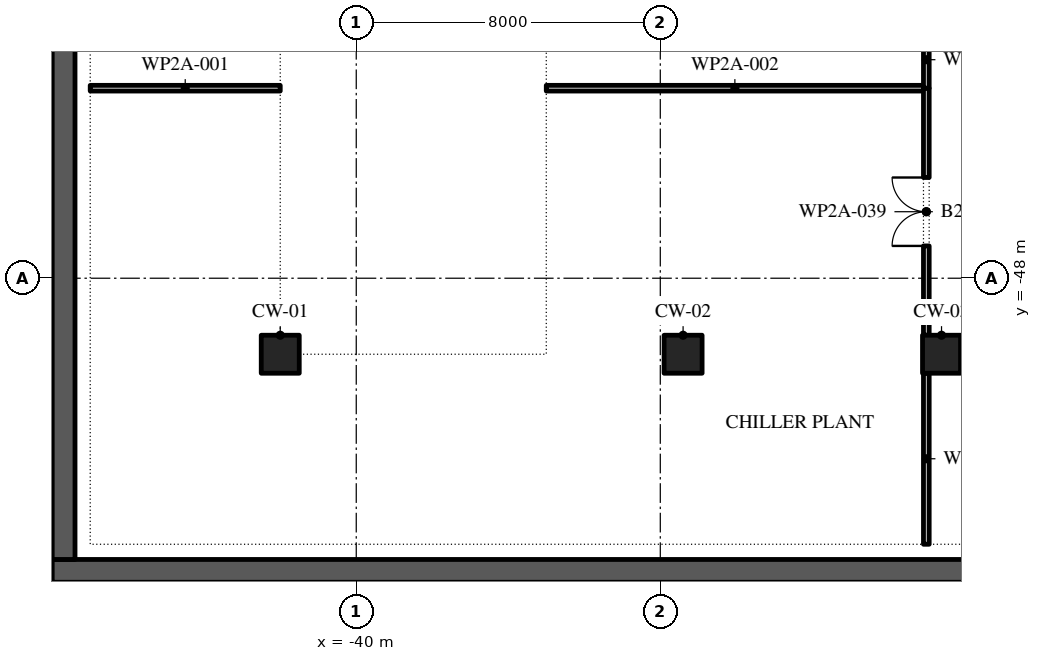
"""IFC4 building model, lengths in metres.
Left out: names, types, materials, properties, quantities, classifications, styles, units other than length and angle.
Written with IfcOpenShell. Run it as: python <this file> out.ifc"""

import sys

from ifc_helpers import new_model, si_unit, direction, frame, frame_2d, origin, origin_2d, place, context, subcontext, project, spatial, rectangle, extrude, element, fill, save


model = new_model("IFC4")
c1 = context("Model", 3, precision=1e-05, world=origin(), true_north=direction((0.0, 1.0)))
c2 = subcontext(c1, "Body", "Model", "MODEL_VIEW")
j1 = project(units=[si_unit("LENGTHUNIT", "METRE"), si_unit("PLANEANGLEUNIT", "RADIAN")], contexts=[c1])
p1 = place(None, origin())
s1 = spatial("IfcSite", under=j1, at=p1, CompositionType="ELEMENT")
p2 = place(p1, origin())
s2 = spatial("IfcBuilding", under=s1, at=p2, CompositionType="ELEMENT")
p3 = place(p2, frame((0.0, 0.0, -10.4)))
s3 = spatial("IfcBuildingStorey", under=s2, at=p3, CompositionType="ELEMENT", Elevation=-10.4)
p4 = place(p3, frame((-48.0, -55.7, -0.3), z_axis=(0.0, 0.0, 1.0), x_axis=(1.0, 0.0, 0.0)))
e1 = element("IfcWall", 1, at=p4, inside=s3, PredefinedType="SOLIDWALL", context=c2, shape_type="SweptSolid", body=[
    extrude(rectangle(XDim=96.0, YDim=0.6, at=frame_2d((48.0, 0.0))), origin(), (0.0, 0.0, 1.0), 5.5),
])
p5 = place(p3, frame((-47.7, -55.4, -0.3), z_axis=(0.0, 0.0, 1.0), x_axis=(0.0, 1.0, 0.0)))
e2 = element("IfcWall", 2, at=p5, inside=s3, PredefinedType="SOLIDWALL", context=c2, shape_type="SweptSolid", body=[
    extrude(rectangle(XDim=94.8, YDim=0.6, at=frame_2d((47.4, 0.0))), origin(), (0.0, 0.0, 1.0), 5.5),
])
for number, where, z_axis, x_axis in (
    (3, (-42.0, -50.0, -0.3), (0.0, 0.0, 1.0), (1.0, 0.0, 0.0)),
    (4, (-31.4, -50.0, -0.3), (0.0, 0.0, 1.0), (1.0, 0.0, 0.0)),
    (5, (-24.6, -50.0, -0.3), (0.0, 0.0, 1.0), (1.0, 0.0, 0.0)),
):
    element("IfcColumn", number, at=place(p3, frame(where, z_axis=z_axis, x_axis=x_axis)), inside=s3, PredefinedType="COLUMN", context=c2, shape_type="SweptSolid", body=[
        extrude(rectangle(XDim=1.0, YDim=1.0, at=origin_2d()), origin(), (0.0, 0.0, 1.0), 5.5),
    ])
p6 = place(p3, frame((-47.0, -43.0, 0.0), z_axis=(0.0, 0.0, 1.0), x_axis=(1.0, 0.0, 0.0)))
e6 = element("IfcWall", 6, at=p6, inside=s3, PredefinedType="PARTITIONING", context=c2, shape_type="SweptSolid", body=[
    extrude(rectangle(XDim=5.0, YDim=0.15, at=frame_2d((2.5, 0.0))), origin(), (0.0, 0.0, 1.0), 4.9),
])
p7 = place(p3, frame((-35.0, -43.0, 0.0), z_axis=(0.0, 0.0, 1.0), x_axis=(1.0, 0.0, 0.0)))
e7 = element("IfcWall", 7, at=p7, inside=s3, PredefinedType="PARTITIONING", context=c2, shape_type="SweptSolid", body=[
    extrude(rectangle(XDim=9.925, YDim=0.15, at=frame_2d((4.962, 0.0))), origin(), (0.0, 0.0, 1.0), 4.9),
])
p8 = place(p3, frame((-25.0, -55.0, 0.0), z_axis=(0.0, 0.0, 1.0), x_axis=(0.0, 1.0, 0.0)))
e8 = element("IfcWall", 8, at=p8, inside=s3, PredefinedType="PARTITIONING", context=c2, shape_type="SweptSolid", body=[
    extrude(rectangle(XDim=4.5, YDim=0.15, at=frame_2d((2.25, 0.0))), origin(), (0.0, 0.0, 1.0), 4.9),
])
p9 = place(p3, frame((-25.0, -49.5, 0.0), z_axis=(0.0, 0.0, 1.0), x_axis=(0.0, 1.0, 0.0)))
e9 = element("IfcWall", 9, at=p9, inside=s3, PredefinedType="PARTITIONING", context=c2, shape_type="SweptSolid", body=[
    extrude(rectangle(XDim=6.5, YDim=0.15, at=frame_2d((3.25, 0.0))), origin(), (0.0, 0.0, 1.0), 4.9),
])
p10 = place(p9, frame((2.35, 0.0, 0.0)))
e10 = element("IfcOpeningElement", 10, at=p10, cuts=e9, PredefinedType="OPENING", context=c2, shape_type="SweptSolid", body=[
    extrude(rectangle(XDim=1.8, YDim=2.1, at=frame_2d((0.9, 1.05))), frame((0.0, 0.085, 0.0), z_axis=(0.0, -1.0, 0.0), x_axis=(1.0, 0.0, 0.0)), (0.0, 0.0, 1.0), 0.17),
])
p11 = place(p3, frame((-25.0, -43.0, 0.0), z_axis=(0.0, 0.0, 1.0), x_axis=(0.0, 1.0, 0.0)))
e11 = element("IfcWall", 11, at=p11, inside=s3, PredefinedType="PARTITIONING", context=c2, shape_type="SweptSolid", body=[
    extrude(rectangle(XDim=1.5, YDim=0.15, at=frame_2d((0.75, 0.0))), origin(), (0.0, 0.0, 1.0), 4.9),
])
p12 = place(p10, origin())
e12 = element("IfcDoor", 12, at=p12, inside=s3, OperationType="SINGLE_SWING_LEFT", PredefinedType="DOOR", context=c2, shape_type="SweptSolid", body=[
    extrude(rectangle(XDim=1.8, YDim=2.1, at=frame_2d((0.9, 1.05))), frame((0.0, 0.025, 0.0), z_axis=(0.0, -1.0, 0.0), x_axis=(1.0, 0.0, 0.0)), (0.0, 0.0, 1.0), 0.05),
])
fill(e10, e12)
save(model, sys.argv[1])
